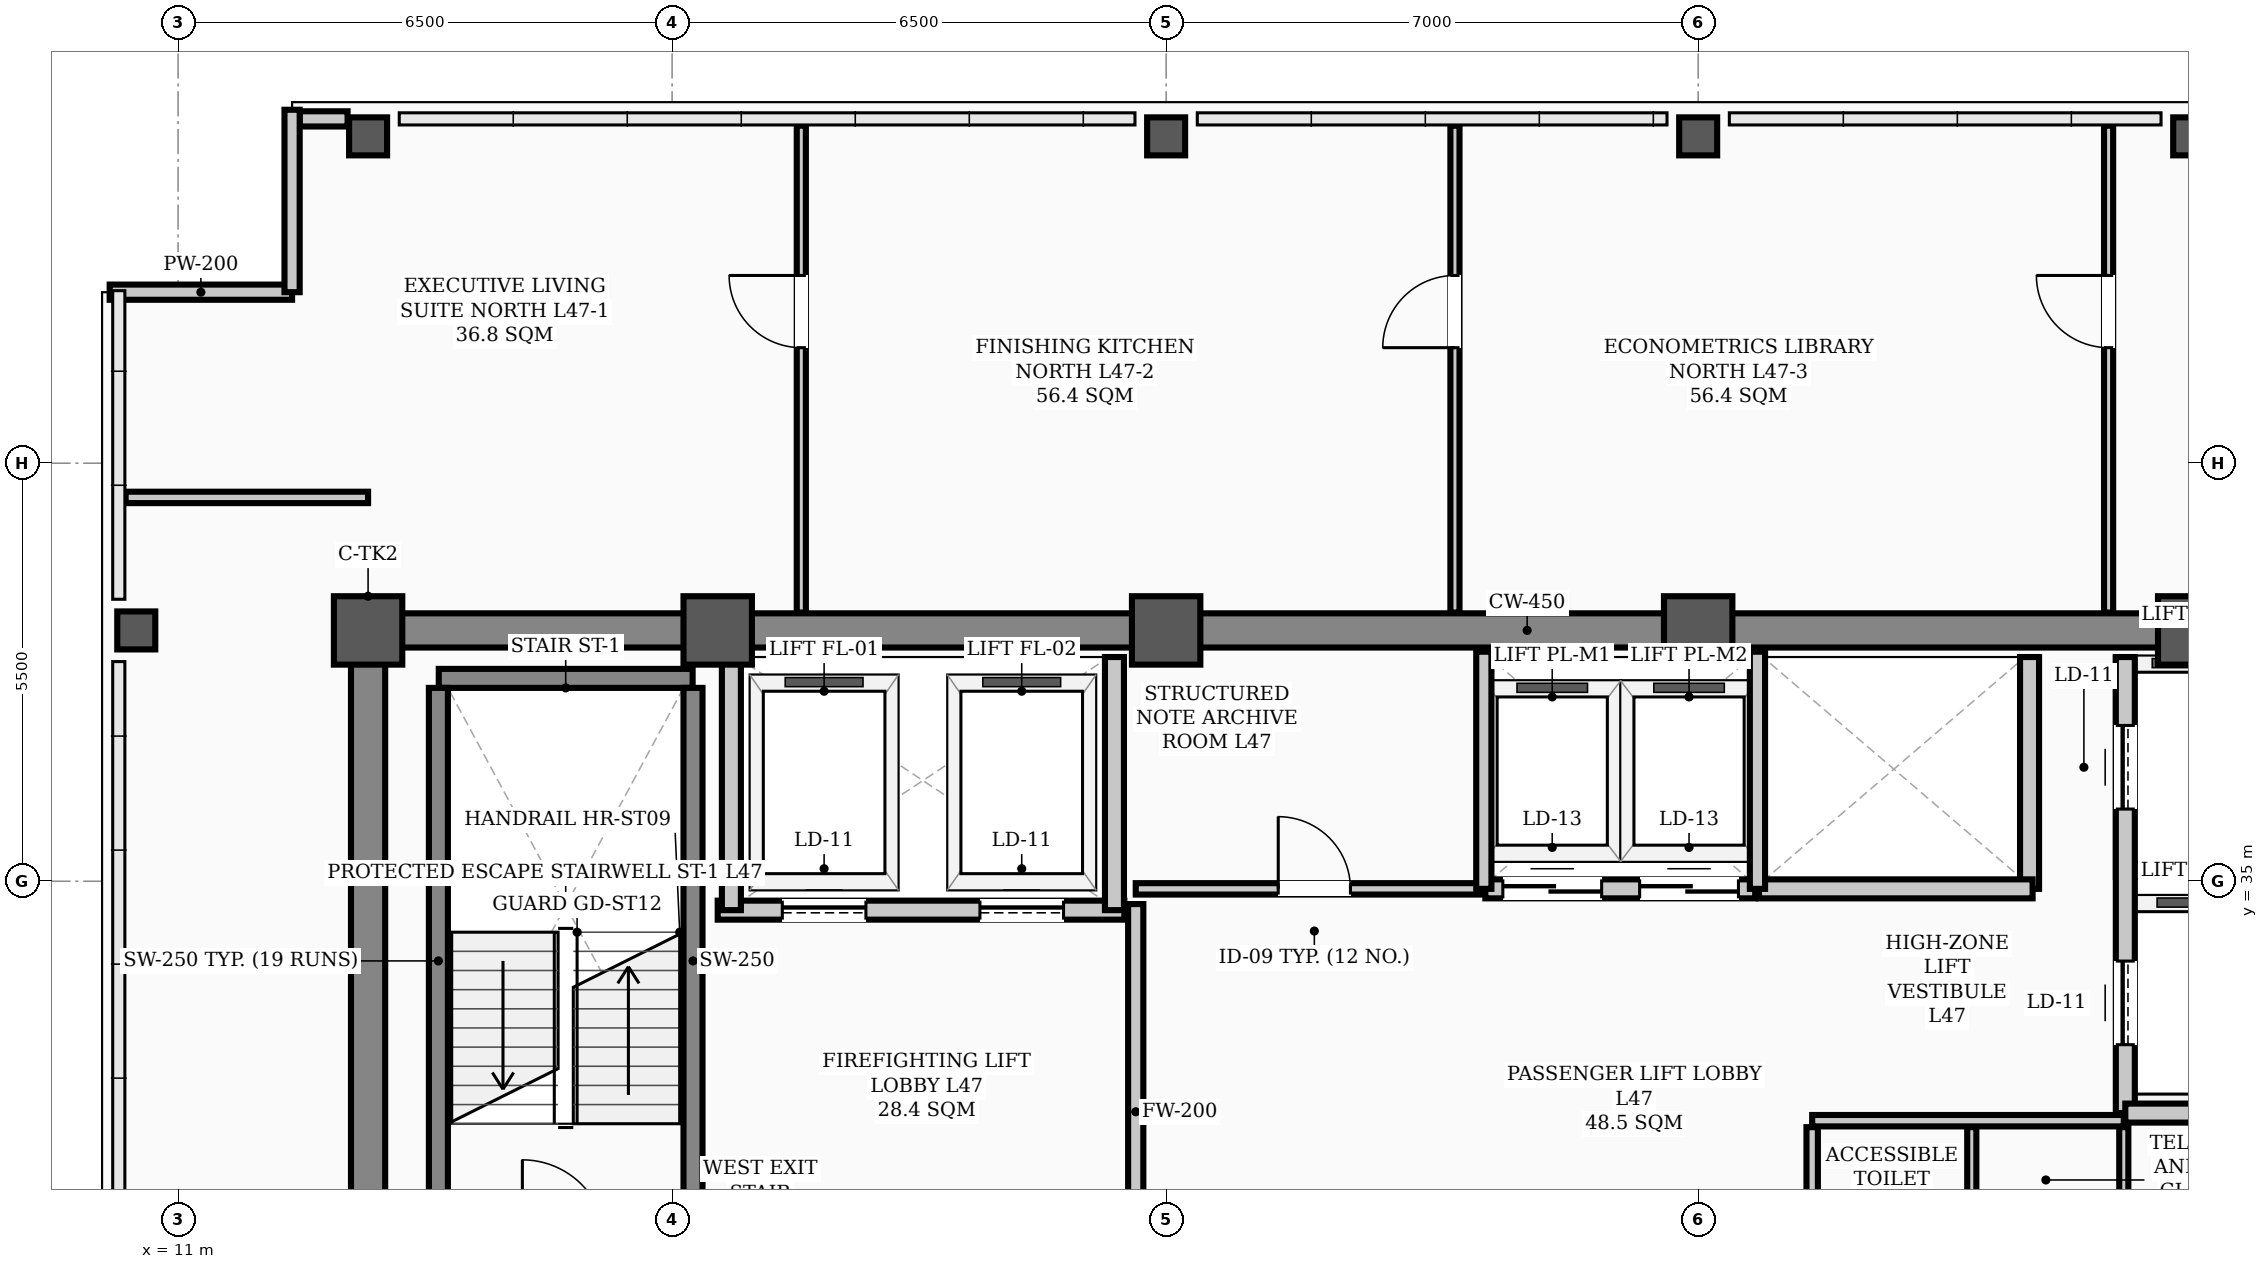
"""IFC4 building model, lengths in metres.
Left out: names, types, materials, properties, quantities, classifications, styles, units other than length and angle.
Written with IfcOpenShell. Run it as: python <this file> out.ifc"""

import sys

from ifc_helpers import new_model, si_unit, direction, frame, frame_2d, origin, origin_2d, place, context, subcontext, project, spatial, rectangle, hollow_rectangle, extrude, element, fill, save


model = new_model("IFC4")
c1 = context("Model", 3, precision=1e-05, world=origin(), true_north=direction((0.0, 1.0)))
c2 = subcontext(c1, "Body", "Model", "MODEL_VIEW")
j1 = project(units=[si_unit("LENGTHUNIT", "METRE"), si_unit("PLANEANGLEUNIT", "RADIAN")], contexts=[c1])
p1 = place(None, origin())
s1 = spatial("IfcSite", under=j1, at=p1, CompositionType="ELEMENT")
p2 = place(p1, origin())
s2 = spatial("IfcBuilding", under=s1, at=p2, CompositionType="ELEMENT")
p3 = place(p2, frame((0.0, 0.0, 189.0)))
s3 = spatial("IfcBuildingStorey", under=s2, at=p3, CompositionType="ELEMENT", Elevation=189.0)
for number, where, z_axis, x_axis in (
    (1, (13.5, 38.3, 0.0), (0.0, 0.0, 1.0), (1.0, 0.0, 0.0)),
    (2, (18.1, 38.3, 0.0), (0.0, 0.0, 1.0), (1.0, 0.0, 0.0)),
    (3, (24.0, 38.3, 0.0), (0.0, 0.0, 1.0), (1.0, 0.0, 0.0)),
    (4, (31.0, 38.3, 0.0), (0.0, 0.0, 1.0), (1.0, 0.0, 0.0)),
    (5, (37.5, 38.3, 0.0), (0.0, 0.0, 1.0), (1.0, 0.0, 0.0)),
):
    element("IfcColumn", number, at=place(p3, frame(where, z_axis=z_axis, x_axis=x_axis)), inside=s3, PredefinedType="COLUMN", context=c2, shape_type="SweptSolid", body=[
        extrude(hollow_rectangle(XDim=0.9, YDim=0.9, WallThickness=0.035, InnerFilletRadius=0.017, OuterFilletRadius=0.052, at=origin_2d()), origin(), (0.0, 0.0, 1.0), 3.9),
    ])
for number, where, z_axis, x_axis in (
    (6, (10.45, 38.3, 0.0), (0.0, 0.0, 1.0), (1.0, 0.0, 0.0)),
    (7, (13.5, 44.8, 0.0), (0.0, 0.0, 1.0), (1.0, 0.0, 0.0)),
    (8, (24.0, 44.8, 0.0), (0.0, 0.0, 1.0), (1.0, 0.0, 0.0)),
    (9, (31.0, 44.8, 0.0), (0.0, 0.0, 1.0), (1.0, 0.0, 0.0)),
    (10, (37.5, 44.8, 0.0), (0.0, 0.0, 1.0), (1.0, 0.0, 0.0)),
):
    element("IfcColumn", number, at=place(p3, frame(where, z_axis=z_axis, x_axis=x_axis)), inside=s3, PredefinedType="COLUMN", context=c2, shape_type="SweptSolid", body=[
        extrude(hollow_rectangle(XDim=0.5, YDim=0.5, WallThickness=0.024, InnerFilletRadius=0.012, OuterFilletRadius=0.036, at=origin_2d()), origin(), (0.0, 0.0, 1.0), 3.9),
    ])
p4 = place(p3, frame((12.6, 45.03, 0.0), z_axis=(0.0, 0.0, 1.0), x_axis=(1.0, 0.0, 0.0)))
e11 = element("IfcWall", 11, at=p4, inside=s3, PredefinedType="PARAPET", context=c2, shape_type="SweptSolid", body=[
    extrude(rectangle(XDim=0.63, YDim=0.2, at=frame_2d((0.315, 0.0))), origin(), (0.0, 0.0, 1.0), 1.2),
])
for number, where, z_axis, x_axis in (
    (12, (10.1, 42.75, 0.0), (0.0, 0.0, 1.0), (1.0, 0.0, 0.0)),
    (13, (12.5, 42.75, 0.0), (0.0, 0.0, 1.0), (0.0, 1.0, 0.0)),
):
    element("IfcWall", number, at=place(p3, frame(where, z_axis=z_axis, x_axis=x_axis)), inside=s3, PredefinedType="PARAPET", context=c2, shape_type="SweptSolid", body=[
        extrude(rectangle(XDim=2.4, YDim=0.2, at=frame_2d((1.2, 0.0))), origin(), (0.0, 0.0, 1.0), 1.2),
    ])
p5 = place(p3, frame((13.5, 38.3, 0.0), z_axis=(0.0, 0.0, 1.0), x_axis=(1.0, 0.0, 0.0)))
e14 = element("IfcWall", 14, at=p5, inside=s3, PredefinedType="SHEAR", context=c2, shape_type="SweptSolid", body=[
    extrude(rectangle(XDim=30.5, YDim=0.45, at=frame_2d((15.25, 0.0))), origin(), (0.0, 0.0, 1.0), 3.72),
])
p6 = place(p3, frame((13.5, 29.35, 0.0), z_axis=(0.0, 0.0, 1.0), x_axis=(0.0, 1.0, 0.0)))
e15 = element("IfcWall", 15, at=p6, inside=s3, PredefinedType="SHEAR", context=c2, shape_type="SweptSolid", body=[
    extrude(rectangle(XDim=8.6, YDim=0.45, at=frame_2d((4.3, 0.0))), origin(), (0.0, 0.0, 1.0), 3.72),
])
p7 = place(p3, frame((14.43, 37.669, 0.0), z_axis=(0.0, 0.0, 1.0), x_axis=(1.0, 0.0, 0.0)))
e16 = element("IfcWall", 16, at=p7, inside=s3, PredefinedType="STANDARD", context=c2, shape_type="SweptSolid", body=[
    extrude(rectangle(XDim=3.34, YDim=0.25, at=frame_2d((1.67, 0.0))), origin(), (0.0, 0.0, 1.0), 3.72),
])
for number, where, z_axis, x_axis in (
    (17, (14.425, 30.36, 0.0), (0.0, 0.0, 1.0), (0.0, 1.0, 0.0)),
    (18, (17.775, 30.36, 0.0), (0.0, 0.0, 1.0), (0.0, 1.0, 0.0)),
):
    element("IfcWall", number, at=place(p3, frame(where, z_axis=z_axis, x_axis=x_axis)), inside=s3, PredefinedType="STANDARD", context=c2, shape_type="SweptSolid", body=[
        extrude(rectangle(XDim=7.184, YDim=0.25, at=frame_2d((3.592, 0.0))), origin(), (0.0, 0.0, 1.0), 3.72),
    ])
p8 = place(p3, frame((18.1, 34.62, 0.0), z_axis=(0.0, 0.0, 1.0), x_axis=(1.0, 0.0, 0.0)))
e19 = element("IfcWall", 19, at=p8, inside=s3, PredefinedType="STANDARD", context=c2, shape_type="SweptSolid", body=[
    extrude(rectangle(XDim=5.35, YDim=0.25, at=frame_2d((2.675, 0.0))), origin(), (0.0, 0.0, 1.0), 3.72),
])
p9 = place(p8, frame((0.85, 0.0, 0.0)))
e20 = element("IfcOpeningElement", 20, at=p9, cuts=e19, PredefinedType="OPENING", context=c2, shape_type="SweptSolid", body=[
    extrude(rectangle(XDim=1.1, YDim=2.08, at=frame_2d((0.55, 1.04))), frame((0.0, 0.135, 0.0), z_axis=(0.0, -1.0, 0.0), x_axis=(1.0, 0.0, 0.0)), (0.0, 0.0, 1.0), 0.27),
])
p10 = place(p8, frame((3.45, 0.0, 0.0)))
e21 = element("IfcOpeningElement", 21, at=p10, cuts=e19, PredefinedType="OPENING", context=c2, shape_type="SweptSolid", body=[
    extrude(rectangle(XDim=1.1, YDim=2.08, at=frame_2d((0.55, 1.04))), frame((0.0, 0.135, 0.0), z_axis=(0.0, -1.0, 0.0), x_axis=(1.0, 0.0, 0.0)), (0.0, 0.0, 1.0), 0.27),
])
p11 = place(p3, frame((36.62, 31.95, 0.0), z_axis=(0.0, 0.0, 1.0), x_axis=(0.0, 1.0, 0.0)))
e22 = element("IfcWall", 22, at=p11, inside=s3, PredefinedType="STANDARD", context=c2, shape_type="SweptSolid", body=[
    extrude(rectangle(XDim=6.0, YDim=0.25, at=frame_2d((3.0, 0.0))), origin(), (0.0, 0.0, 1.0), 3.35),
])
p12 = place(p11, frame((0.9, 0.0, 0.0)))
e23 = element("IfcOpeningElement", 23, at=p12, cuts=e22, PredefinedType="OPENING", context=c2, shape_type="SweptSolid", body=[
    extrude(rectangle(XDim=1.1, YDim=2.08, at=frame_2d((0.55, 1.04))), frame((0.0, 0.135, 0.0), z_axis=(0.0, -1.0, 0.0), x_axis=(1.0, 0.0, 0.0)), (0.0, 0.0, 1.0), 0.27),
])
p13 = place(p11, frame((4.0, 0.0, 0.0)))
e24 = element("IfcOpeningElement", 24, at=p13, cuts=e22, PredefinedType="OPENING", context=c2, shape_type="SweptSolid", body=[
    extrude(rectangle(XDim=1.1, YDim=2.08, at=frame_2d((0.55, 1.04))), frame((0.0, 0.135, 0.0), z_axis=(0.0, -1.0, 0.0), x_axis=(1.0, 0.0, 0.0)), (0.0, 0.0, 1.0), 0.27),
])
p14 = place(p3, frame((36.62, 31.95, 0.0), z_axis=(0.0, 0.0, 1.0), x_axis=(1.0, 0.0, 0.0)))
e25 = element("IfcWall", 25, at=p14, inside=s3, PredefinedType="STANDARD", context=c2, shape_type="SweptSolid", body=[
    extrude(rectangle(XDim=1.9, YDim=0.25, at=frame_2d((0.95, 0.0))), origin(), (0.0, 0.0, 1.0), 3.48),
])
for number, where, z_axis, x_axis in (
    (26, (18.28, 34.62, 0.0), (0.0, 0.0, 1.0), (0.0, 1.0, 0.0)),
    (27, (23.32, 34.62, 0.0), (0.0, 0.0, 1.0), (0.0, 1.0, 0.0)),
):
    element("IfcWall", number, at=place(p3, frame(where, z_axis=z_axis, x_axis=x_axis)), inside=s3, PredefinedType="STANDARD", context=c2, shape_type="SweptSolid", body=[
        extrude(rectangle(XDim=3.33, YDim=0.25, at=frame_2d((1.665, 0.0))), origin(), (0.0, 0.0, 1.0), 3.35),
    ])
p15 = place(p3, frame((35.36, 34.9, 0.0), z_axis=(0.0, 0.0, 1.0), x_axis=(0.0, 1.0, 0.0)))
e28 = element("IfcWall", 28, at=p15, inside=s3, PredefinedType="STANDARD", context=c2, shape_type="SweptSolid", body=[
    extrude(rectangle(XDim=3.05, YDim=0.25, at=frame_2d((1.525, 0.0))), origin(), (0.0, 0.0, 1.0), 3.35),
])
p16 = place(p3, frame((28.2, 34.9, 0.0), z_axis=(0.0, 0.0, 1.0), x_axis=(1.0, 0.0, 0.0)))
e29 = element("IfcWall", 29, at=p16, inside=s3, PredefinedType="STANDARD", context=c2, shape_type="SweptSolid", body=[
    extrude(rectangle(XDim=3.55, YDim=0.25, at=frame_2d((1.775, 0.0))), origin(), (0.0, 0.0, 1.0), 3.72),
])
p17 = place(p16, frame((0.23, 0.0, 0.0)))
e30 = element("IfcOpeningElement", 30, at=p17, cuts=e29, PredefinedType="OPENING", context=c2, shape_type="SweptSolid", body=[
    extrude(rectangle(XDim=1.3, YDim=2.08, at=frame_2d((0.65, 1.04))), frame((0.0, 0.135, 0.0), z_axis=(0.0, -1.0, 0.0), x_axis=(1.0, 0.0, 0.0)), (0.0, 0.0, 1.0), 0.27),
])
p18 = place(p16, frame((2.03, 0.0, 0.0)))
e31 = element("IfcOpeningElement", 31, at=p18, cuts=e29, PredefinedType="OPENING", context=c2, shape_type="SweptSolid", body=[
    extrude(rectangle(XDim=1.3, YDim=2.08, at=frame_2d((0.65, 1.04))), frame((0.0, 0.135, 0.0), z_axis=(0.0, -1.0, 0.0), x_axis=(1.0, 0.0, 0.0)), (0.0, 0.0, 1.0), 0.27),
])
p19 = place(p3, frame((31.8, 34.9, 0.0), z_axis=(0.0, 0.0, 1.0), x_axis=(1.0, 0.0, 0.0)))
e32 = element("IfcWall", 32, at=p19, inside=s3, PredefinedType="STANDARD", context=c2, shape_type="SweptSolid", body=[
    extrude(rectangle(XDim=3.6, YDim=0.25, at=frame_2d((1.8, 0.0))), origin(), (0.0, 0.0, 1.0), 3.72),
])
p20 = place(p3, frame((23.6, 34.9, 0.0), z_axis=(0.0, 0.0, 1.0), x_axis=(1.0, 0.0, 0.0)))
e33 = element("IfcWall", 33, at=p20, inside=s3, PredefinedType="PARTITIONING", context=c2, shape_type="SweptSolid", body=[
    extrude(rectangle(XDim=4.58, YDim=0.15, at=frame_2d((2.29, 0.0))), origin(), (0.0, 0.0, 1.0), 3.72),
])
p21 = place(p20, frame((1.875, 0.0, 0.0)))
e34 = element("IfcOpeningElement", 34, at=p21, cuts=e33, PredefinedType="OPENING", context=c2, shape_type="SweptSolid", body=[
    extrude(rectangle(XDim=0.95, YDim=2.08, at=frame_2d((0.475, 1.04))), frame((0.0, 0.085, 0.0), z_axis=(0.0, -1.0, 0.0), x_axis=(1.0, 0.0, 0.0)), (0.0, 0.0, 1.0), 0.17),
])
p22 = place(p3, frame((32.5, 31.85, 0.0), z_axis=(0.0, 0.0, 1.0), x_axis=(1.0, 0.0, 0.0)))
e35 = element("IfcWall", 35, at=p22, inside=s3, PredefinedType="PARTITIONING", context=c2, shape_type="SweptSolid", body=[
    extrude(rectangle(XDim=4.1, YDim=0.15, at=frame_2d((2.05, 0.0))), origin(), (0.0, 0.0, 1.0), 3.72),
])
p23 = place(p3, frame((10.31, 40.05, 0.0), z_axis=(0.0, 0.0, 1.0), x_axis=(1.0, 0.0, 0.0)))
e36 = element("IfcWall", 36, at=p23, inside=s3, PredefinedType="PARTITIONING", context=c2, shape_type="SweptSolid", body=[
    extrude(rectangle(XDim=3.19, YDim=0.15, at=frame_2d((1.595, 0.0))), origin(), (0.0, 0.0, 1.0), 3.2),
])
p24 = place(p3, frame((23.6, 29.235, 0.0), z_axis=(0.0, 0.0, 1.0), x_axis=(0.0, 1.0, 0.0)))
e37 = element("IfcWall", 37, at=p24, inside=s3, PredefinedType="STANDARD", context=c2, shape_type="SweptSolid", body=[
    extrude(rectangle(XDim=5.465, YDim=0.2, at=frame_2d((2.732, 0.0))), origin(), (0.0, 0.0, 1.0), 3.2),
])
p25 = place(p3, frame((32.5, 29.235, 0.0), z_axis=(0.0, 0.0, 1.0), x_axis=(0.0, 1.0, 0.0)))
e38 = element("IfcWall", 38, at=p25, inside=s3, PredefinedType="PARTITIONING", context=c2, shape_type="SweptSolid", body=[
    extrude(rectangle(XDim=2.53, YDim=0.15, at=frame_2d((1.265, 0.0))), origin(), (0.0, 0.0, 1.0), 3.35),
])
for number, where, z_axis, x_axis in (
    (39, (36.6, 29.235, 0.0), (0.0, 0.0, 1.0), (0.0, 1.0, 0.0)),
    (40, (34.6, 29.235, 0.0), (0.0, 0.0, 1.0), (0.0, 1.0, 0.0)),
):
    element("IfcWall", number, at=place(p3, frame(where, z_axis=z_axis, x_axis=x_axis)), inside=s3, PredefinedType="PARTITIONING", context=c2, shape_type="SweptSolid", body=[
        extrude(rectangle(XDim=2.53, YDim=0.12, at=frame_2d((1.265, 0.0))), origin(), (0.0, 0.0, 1.0), 3.35),
    ])
p26 = place(p3, frame((19.2, 38.535, 0.0), z_axis=(0.0, 0.0, 1.0), x_axis=(0.0, 1.0, 0.0)))
e41 = element("IfcWall", 41, at=p26, inside=s3, PredefinedType="PARTITIONING", context=c2, shape_type="SweptSolid", body=[
    extrude(rectangle(XDim=6.405, YDim=0.12, at=frame_2d((3.203, 0.0))), origin(), (0.0, 0.0, 1.0), 3.212),
])
p27 = place(p26, frame((3.485, 0.0, 0.0)))
e42 = element("IfcOpeningElement", 42, at=p27, cuts=e41, PredefinedType="OPENING", context=c2, shape_type="SweptSolid", body=[
    extrude(rectangle(XDim=0.95, YDim=2.08, at=frame_2d((0.475, 1.04))), frame((0.0, 0.07, 0.0), z_axis=(0.0, -1.0, 0.0), x_axis=(1.0, 0.0, 0.0)), (0.0, 0.0, 1.0), 0.14),
])
p28 = place(p3, frame((27.8, 38.535, 0.0), z_axis=(0.0, 0.0, 1.0), x_axis=(0.0, 1.0, 0.0)))
e43 = element("IfcWall", 43, at=p28, inside=s3, PredefinedType="PARTITIONING", context=c2, shape_type="SweptSolid", body=[
    extrude(rectangle(XDim=6.405, YDim=0.12, at=frame_2d((3.203, 0.0))), origin(), (0.0, 0.0, 1.0), 3.212),
])
p29 = place(p28, frame((3.485, 0.0, 0.0)))
e44 = element("IfcOpeningElement", 44, at=p29, cuts=e43, PredefinedType="OPENING", context=c2, shape_type="SweptSolid", body=[
    extrude(rectangle(XDim=0.95, YDim=2.08, at=frame_2d((0.475, 1.04))), frame((0.0, 0.07, 0.0), z_axis=(0.0, -1.0, 0.0), x_axis=(1.0, 0.0, 0.0)), (0.0, 0.0, 1.0), 0.14),
])
p30 = place(p3, frame((36.4, 38.535, 0.0), z_axis=(0.0, 0.0, 1.0), x_axis=(0.0, 1.0, 0.0)))
e45 = element("IfcWall", 45, at=p30, inside=s3, PredefinedType="PARTITIONING", context=c2, shape_type="SweptSolid", body=[
    extrude(rectangle(XDim=6.405, YDim=0.12, at=frame_2d((3.203, 0.0))), origin(), (0.0, 0.0, 1.0), 3.212),
])
p31 = place(p30, frame((3.485, 0.0, 0.0)))
e46 = element("IfcOpeningElement", 46, at=p31, cuts=e45, PredefinedType="OPENING", context=c2, shape_type="SweptSolid", body=[
    extrude(rectangle(XDim=0.95, YDim=2.08, at=frame_2d((0.475, 1.04))), frame((0.0, 0.07, 0.0), z_axis=(0.0, -1.0, 0.0), x_axis=(1.0, 0.0, 0.0)), (0.0, 0.0, 1.0), 0.14),
])
for number, where, z_axis, x_axis in (
    (47, (28.18, 34.9, 0.0), (0.0, 0.0, 1.0), (0.0, 1.0, 0.0)),
    (48, (31.78, 34.9, 0.0), (0.0, 0.0, 1.0), (0.0, 1.0, 0.0)),
):
    element("IfcWall", number, at=place(p3, frame(where, z_axis=z_axis, x_axis=x_axis)), inside=s3, PredefinedType="STANDARD", context=c2, shape_type="SweptSolid", body=[
        extrude(rectangle(XDim=3.12, YDim=0.2, at=frame_2d((1.56, 0.0))), origin(), (0.0, 0.0, 1.0), 3.35),
    ])
p32 = place(p21, origin())
e49 = element("IfcDoor", 49, at=p32, inside=s3, OperationType="SINGLE_SWING_LEFT", PredefinedType="DOOR", context=c2, shape_type="SweptSolid", body=[
    extrude(rectangle(XDim=0.95, YDim=2.08, at=frame_2d((0.475, 1.04))), frame((0.0, 0.025, 0.0), z_axis=(0.0, -1.0, 0.0), x_axis=(1.0, 0.0, 0.0)), (0.0, 0.0, 1.0), 0.05),
])
fill(e34, e49)
p33 = place(p27, origin())
e50 = element("IfcDoor", 50, at=p33, inside=s3, OperationType="SINGLE_SWING_RIGHT", PredefinedType="DOOR", context=c2, shape_type="SweptSolid", body=[
    extrude(rectangle(XDim=0.95, YDim=2.08, at=frame_2d((0.475, 1.04))), frame((0.0, 0.025, 0.0), z_axis=(0.0, -1.0, 0.0), x_axis=(1.0, 0.0, 0.0)), (0.0, 0.0, 1.0), 0.05),
])
fill(e42, e50)
p34 = place(p29, origin())
e51 = element("IfcDoor", 51, at=p34, inside=s3, OperationType="SINGLE_SWING_LEFT", PredefinedType="DOOR", context=c2, shape_type="SweptSolid", body=[
    extrude(rectangle(XDim=0.95, YDim=2.08, at=frame_2d((0.475, 1.04))), frame((0.0, 0.025, 0.0), z_axis=(0.0, -1.0, 0.0), x_axis=(1.0, 0.0, 0.0)), (0.0, 0.0, 1.0), 0.05),
])
fill(e44, e51)
p35 = place(p31, origin())
e52 = element("IfcDoor", 52, at=p35, inside=s3, OperationType="SINGLE_SWING_RIGHT", PredefinedType="DOOR", context=c2, shape_type="SweptSolid", body=[
    extrude(rectangle(XDim=0.95, YDim=2.08, at=frame_2d((0.475, 1.04))), frame((0.0, 0.025, 0.0), z_axis=(0.0, -1.0, 0.0), x_axis=(1.0, 0.0, 0.0)), (0.0, 0.0, 1.0), 0.05),
])
fill(e46, e52)
p36 = place(p9, origin())
e53 = element("IfcDoor", 53, at=p36, inside=s3, OperationType="SLIDING_TO_LEFT", PredefinedType="DOOR", context=c2, shape_type="SweptSolid", body=[
    extrude(rectangle(XDim=1.1, YDim=2.08, at=frame_2d((0.55, 1.04))), frame((0.0, 0.025, 0.0), z_axis=(0.0, -1.0, 0.0), x_axis=(1.0, 0.0, 0.0)), (0.0, 0.0, 1.0), 0.05),
])
fill(e20, e53)
p37 = place(p10, origin())
e54 = element("IfcDoor", 54, at=p37, inside=s3, OperationType="SLIDING_TO_LEFT", PredefinedType="DOOR", context=c2, shape_type="SweptSolid", body=[
    extrude(rectangle(XDim=1.1, YDim=2.08, at=frame_2d((0.55, 1.04))), frame((0.0, 0.025, 0.0), z_axis=(0.0, -1.0, 0.0), x_axis=(1.0, 0.0, 0.0)), (0.0, 0.0, 1.0), 0.05),
])
fill(e21, e54)
p38 = place(p12, origin())
e55 = element("IfcDoor", 55, at=p38, inside=s3, OperationType="SLIDING_TO_LEFT", PredefinedType="DOOR", context=c2, shape_type="SweptSolid", body=[
    extrude(rectangle(XDim=1.1, YDim=2.08, at=frame_2d((0.55, 1.04))), frame((0.0, 0.025, 0.0), z_axis=(0.0, -1.0, 0.0), x_axis=(1.0, 0.0, 0.0)), (0.0, 0.0, 1.0), 0.05),
])
fill(e23, e55)
p39 = place(p13, origin())
e56 = element("IfcDoor", 56, at=p39, inside=s3, OperationType="SLIDING_TO_LEFT", PredefinedType="DOOR", context=c2, shape_type="SweptSolid", body=[
    extrude(rectangle(XDim=1.1, YDim=2.08, at=frame_2d((0.55, 1.04))), frame((0.0, 0.025, 0.0), z_axis=(0.0, -1.0, 0.0), x_axis=(1.0, 0.0, 0.0)), (0.0, 0.0, 1.0), 0.05),
])
fill(e24, e56)
p40 = place(p17, origin())
e57 = element("IfcDoor", 57, at=p40, inside=s3, OperationType="DOUBLE_DOOR_SLIDING", PredefinedType="DOOR", context=c2, shape_type="SweptSolid", body=[
    extrude(rectangle(XDim=1.3, YDim=2.08, at=frame_2d((0.65, 1.04))), frame((0.0, 0.025, 0.0), z_axis=(0.0, -1.0, 0.0), x_axis=(1.0, 0.0, 0.0)), (0.0, 0.0, 1.0), 0.05),
])
fill(e30, e57)
p41 = place(p18, origin())
e58 = element("IfcDoor", 58, at=p41, inside=s3, OperationType="DOUBLE_DOOR_SLIDING", PredefinedType="DOOR", context=c2, shape_type="SweptSolid", body=[
    extrude(rectangle(XDim=1.3, YDim=2.08, at=frame_2d((0.65, 1.04))), frame((0.0, 0.025, 0.0), z_axis=(0.0, -1.0, 0.0), x_axis=(1.0, 0.0, 0.0)), (0.0, 0.0, 1.0), 0.05),
])
fill(e31, e58)
save(model, sys.argv[1])
